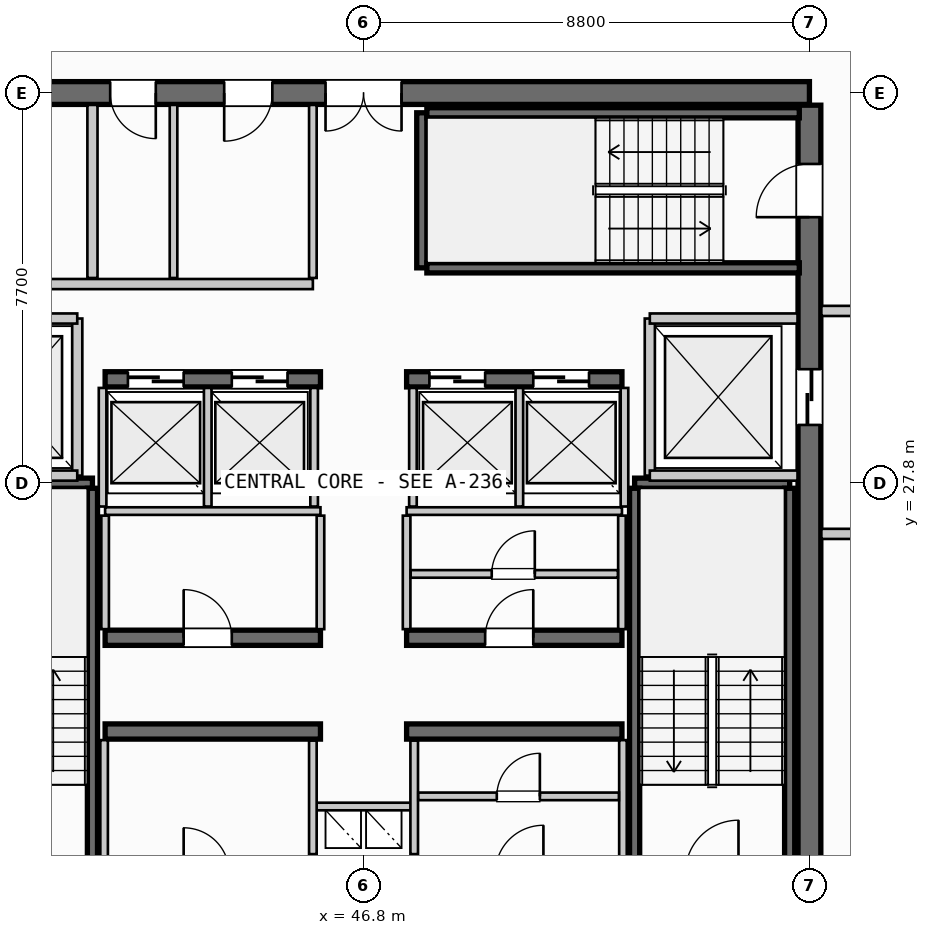
"""IFC4 building model, lengths in metres.
Left out: names, types, materials, properties, quantities, classifications, styles, units other than length and angle.
Written with IfcOpenShell. Run it as: python <this file> out.ifc"""

import sys

from ifc_helpers import new_model, si_unit, direction, frame, frame_2d, origin, place, context, subcontext, project, spatial, rectangle, extrude, source, transform, mapped, element, fill, save


model = new_model("IFC4")
c1 = context("Model", 3, precision=1e-05, world=origin(), true_north=direction((0.0, 1.0)))
c2 = subcontext(c1, "Body", "Model", "MODEL_VIEW")
j1 = project(units=[si_unit("LENGTHUNIT", "METRE"), si_unit("PLANEANGLEUNIT", "RADIAN")], contexts=[c1])
p1 = place(None, origin())
s1 = spatial("IfcSite", under=j1, at=p1, CompositionType="ELEMENT")
p2 = place(p1, origin())
s2 = spatial("IfcBuilding", under=s1, at=p2, CompositionType="ELEMENT")
p3 = place(p2, frame((0.0, 0.0, 259.45)))
s3 = spatial("IfcBuildingStorey", under=s2, at=p3, CompositionType="ELEMENT", Elevation=259.45)
p4 = place(p3, frame((55.6, 35.5, 0.0), z_axis=(0.0, 0.0, 1.0), x_axis=(-1.0, 0.0, 0.0)))
e1 = element("IfcWall", 1, at=p4, inside=s3, PredefinedType="SHEAR", context=c2, shape_type="SweptSolid", body=[
    extrude(rectangle(XDim=17.6, YDim=0.45, at=frame_2d((8.8, 0.0))), origin(), (0.0, 0.0, 1.0), 3.21),
])
p5 = place(p4, frame((8.05, 0.0, 0.0)))
e2 = element("IfcOpeningElement", 2, at=p5, cuts=e1, PredefinedType="OPENING", context=c2, shape_type="SweptSolid", body=[
    extrude(rectangle(XDim=1.5, YDim=2.2, at=frame_2d((0.75, 1.1))), frame((0.0, 0.235, 0.0), z_axis=(0.0, -1.0, 0.0), x_axis=(1.0, 0.0, 0.0)), (0.0, 0.0, 1.0), 0.47),
])
p6 = place(p4, frame((15.1, 0.0, 0.0)))
e3 = element("IfcOpeningElement", 3, at=p6, cuts=e1, PredefinedType="OPENING", context=c2, shape_type="SweptSolid", body=[
    extrude(rectangle(XDim=0.95, YDim=2.15, at=frame_2d((0.475, 1.075))), frame((0.0, 0.235, 0.0), z_axis=(0.0, -1.0, 0.0), x_axis=(1.0, 0.0, 0.0)), (0.0, 0.0, 1.0), 0.47),
])
p7 = place(p4, frame((12.9, 0.0, 0.0)))
e4 = element("IfcOpeningElement", 4, at=p7, cuts=e1, PredefinedType="OPENING", context=c2, shape_type="SweptSolid", body=[
    extrude(rectangle(XDim=0.9, YDim=2.15, at=frame_2d((0.45, 1.075))), frame((0.0, 0.235, 0.0), z_axis=(0.0, -1.0, 0.0), x_axis=(1.0, 0.0, 0.0)), (0.0, 0.0, 1.0), 0.47),
])
p8 = place(p4, frame((10.6, 0.0, 0.0)))
e5 = element("IfcOpeningElement", 5, at=p8, cuts=e1, PredefinedType="OPENING", context=c2, shape_type="SweptSolid", body=[
    extrude(rectangle(XDim=0.95, YDim=2.15, at=frame_2d((0.475, 1.075))), frame((0.0, 0.235, 0.0), z_axis=(0.0, -1.0, 0.0), x_axis=(1.0, 0.0, 0.0)), (0.0, 0.0, 1.0), 0.47),
])
p9 = place(p3, frame((55.6, 20.34, 0.0), z_axis=(0.0, 0.0, 1.0), x_axis=(0.0, 1.0, 0.0)))
e6 = element("IfcWall", 6, at=p9, inside=s3, PredefinedType="SHEAR", context=c2, shape_type="SweptSolid", body=[
    extrude(rectangle(XDim=14.92, YDim=0.45, at=frame_2d((7.46, 0.0))), origin(), (0.0, 0.0, 1.0), 3.21),
])
p10 = place(p9, frame((12.71, 0.0, 0.0)))
e7 = element("IfcOpeningElement", 7, at=p10, cuts=e6, PredefinedType="OPENING", context=c2, shape_type="SweptSolid", body=[
    extrude(rectangle(XDim=1.05, YDim=2.15, at=frame_2d((0.525, 1.075))), frame((0.0, 0.235, 0.0), z_axis=(0.0, -1.0, 0.0), x_axis=(1.0, 0.0, 0.0)), (0.0, 0.0, 1.0), 0.47),
])
p11 = place(p9, frame((8.61, 0.0, 0.0)))
e8 = element("IfcOpeningElement", 8, at=p11, cuts=e6, PredefinedType="OPENING", context=c2, shape_type="SweptSolid", body=[
    extrude(rectangle(XDim=1.1, YDim=2.2, at=frame_2d((0.55, 1.1))), frame((0.0, 0.235, 0.0), z_axis=(0.0, -1.0, 0.0), x_axis=(1.0, 0.0, 0.0)), (0.0, 0.0, 1.0), 0.47),
])
for number, where, z_axis, x_axis in (
    (9, (41.7, 22.9, 0.0), (0.0, 0.0, 1.0), (1.0, 0.0, 0.0)),
    (10, (47.65, 22.9, 0.0), (0.0, 0.0, 1.0), (1.0, 0.0, 0.0)),
):
    element("IfcWall", number, at=place(p3, frame(where, z_axis=z_axis, x_axis=x_axis)), inside=s3, PredefinedType="SHEAR", context=c2, shape_type="SweptSolid", body=[
        extrude(rectangle(XDim=4.25, YDim=0.3, at=frame_2d((2.125, 0.0))), origin(), (0.0, 0.0, 1.0), 3.21),
    ])
p12 = place(p3, frame((41.7, 24.75, 0.0), z_axis=(0.0, 0.0, 1.0), x_axis=(1.0, 0.0, 0.0)))
e11 = element("IfcWall", 11, at=p12, inside=s3, PredefinedType="SHEAR", context=c2, shape_type="SweptSolid", body=[
    extrude(rectangle(XDim=4.25, YDim=0.3, at=frame_2d((2.125, 0.0))), origin(), (0.0, 0.0, 1.0), 3.21),
])
p13 = place(p12, frame((1.55, 0.0, 0.0)))
e12 = element("IfcOpeningElement", 12, at=p13, cuts=e11, PredefinedType="OPENING", context=c2, shape_type="SweptSolid", body=[
    extrude(rectangle(XDim=0.95, YDim=2.15, at=frame_2d((0.475, 1.075))), frame((0.0, 0.16, 0.0), z_axis=(0.0, -1.0, 0.0), x_axis=(1.0, 0.0, 0.0)), (0.0, 0.0, 1.0), 0.32),
])
p14 = place(p3, frame((47.65, 24.75, 0.0), z_axis=(0.0, 0.0, 1.0), x_axis=(1.0, 0.0, 0.0)))
e13 = element("IfcWall", 13, at=p14, inside=s3, PredefinedType="SHEAR", context=c2, shape_type="SweptSolid", body=[
    extrude(rectangle(XDim=4.25, YDim=0.3, at=frame_2d((2.125, 0.0))), origin(), (0.0, 0.0, 1.0), 3.21),
])
p15 = place(p14, frame((1.55, 0.0, 0.0)))
e14 = element("IfcOpeningElement", 14, at=p15, cuts=e13, PredefinedType="OPENING", context=c2, shape_type="SweptSolid", body=[
    extrude(rectangle(XDim=0.95, YDim=2.15, at=frame_2d((0.475, 1.075))), frame((0.0, 0.16, 0.0), z_axis=(0.0, -1.0, 0.0), x_axis=(1.0, 0.0, 0.0)), (0.0, 0.0, 1.0), 0.32),
])
p16 = place(p3, frame((41.7, 29.85, 0.0), z_axis=(0.0, 0.0, 1.0), x_axis=(1.0, 0.0, 0.0)))
e15 = element("IfcWall", 15, at=p16, inside=s3, PredefinedType="SHEAR", context=c2, shape_type="SweptSolid", body=[
    extrude(rectangle(XDim=4.25, YDim=0.3, at=frame_2d((2.125, 0.0))), origin(), (0.0, 0.0, 1.0), 3.21),
])
p17 = place(p16, frame((0.45, 0.0, 0.0)))
e16 = element("IfcOpeningElement", 16, at=p17, cuts=e15, PredefinedType="OPENING", context=c2, shape_type="SweptSolid", body=[
    extrude(rectangle(XDim=1.1, YDim=2.2, at=frame_2d((0.55, 1.1))), frame((0.0, 0.16, 0.0), z_axis=(0.0, -1.0, 0.0), x_axis=(1.0, 0.0, 0.0)), (0.0, 0.0, 1.0), 0.32),
])
p18 = place(p16, frame((2.5, 0.0, 0.0)))
e17 = element("IfcOpeningElement", 17, at=p18, cuts=e15, PredefinedType="OPENING", context=c2, shape_type="SweptSolid", body=[
    extrude(rectangle(XDim=1.1, YDim=2.2, at=frame_2d((0.55, 1.1))), frame((0.0, 0.16, 0.0), z_axis=(0.0, -1.0, 0.0), x_axis=(1.0, 0.0, 0.0)), (0.0, 0.0, 1.0), 0.32),
])
p19 = place(p3, frame((47.65, 29.85, 0.0), z_axis=(0.0, 0.0, 1.0), x_axis=(1.0, 0.0, 0.0)))
e18 = element("IfcWall", 18, at=p19, inside=s3, PredefinedType="SHEAR", context=c2, shape_type="SweptSolid", body=[
    extrude(rectangle(XDim=4.25, YDim=0.3, at=frame_2d((2.125, 0.0))), origin(), (0.0, 0.0, 1.0), 3.21),
])
p20 = place(p19, frame((0.45, 0.0, 0.0)))
e19 = element("IfcOpeningElement", 19, at=p20, cuts=e18, PredefinedType="OPENING", context=c2, shape_type="SweptSolid", body=[
    extrude(rectangle(XDim=1.1, YDim=2.2, at=frame_2d((0.55, 1.1))), frame((0.0, 0.16, 0.0), z_axis=(0.0, -1.0, 0.0), x_axis=(1.0, 0.0, 0.0)), (0.0, 0.0, 1.0), 0.32),
])
p21 = place(p19, frame((2.5, 0.0, 0.0)))
e20 = element("IfcOpeningElement", 20, at=p21, cuts=e18, PredefinedType="OPENING", context=c2, shape_type="SweptSolid", body=[
    extrude(rectangle(XDim=1.1, YDim=2.2, at=frame_2d((0.55, 1.1))), frame((0.0, 0.16, 0.0), z_axis=(0.0, -1.0, 0.0), x_axis=(1.0, 0.0, 0.0)), (0.0, 0.0, 1.0), 0.32),
])
p22 = place(p3, frame((38.39, 27.8, 0.0), z_axis=(0.0, 0.0, 1.0), x_axis=(1.0, 0.0, 0.0)))
e21 = element("IfcWall", 21, at=p22, inside=s3, PredefinedType="SHEAR", context=c2, shape_type="SweptSolid", body=[
    extrude(rectangle(XDim=3.06, YDim=0.2, at=frame_2d((1.53, 0.0))), origin(), (0.0, 0.0, 1.0), 3.21),
])
p23 = place(p3, frame((41.45, 27.7, 0.0), z_axis=(0.0, 0.0, 1.0), x_axis=(0.0, -1.0, 0.0)))
e22 = element("IfcWall", 22, at=p23, inside=s3, PredefinedType="SHEAR", context=c2, shape_type="SweptSolid", body=[
    extrude(rectangle(XDim=7.35, YDim=0.2, at=frame_2d((3.675, 0.0))), origin(), (0.0, 0.0, 1.0), 3.21),
])
p24 = place(p3, frame((52.15, 27.8, 0.0), z_axis=(0.0, 0.0, 1.0), x_axis=(1.0, 0.0, 0.0)))
e23 = element("IfcWall", 23, at=p24, inside=s3, PredefinedType="SHEAR", context=c2, shape_type="SweptSolid", body=[
    extrude(rectangle(XDim=3.06, YDim=0.2, at=frame_2d((1.53, 0.0))), origin(), (0.0, 0.0, 1.0), 3.21),
])
for number, where, z_axis, x_axis in (
    (24, (55.21, 27.7, 0.0), (0.0, 0.0, 1.0), (0.0, -1.0, 0.0)),
    (25, (52.15, 20.35, 0.0), (0.0, 0.0, 1.0), (0.0, 1.0, 0.0)),
):
    element("IfcWall", number, at=place(p3, frame(where, z_axis=z_axis, x_axis=x_axis)), inside=s3, PredefinedType="SHEAR", context=c2, shape_type="SweptSolid", body=[
        extrude(rectangle(XDim=7.35, YDim=0.2, at=frame_2d((3.675, 0.0))), origin(), (0.0, 0.0, 1.0), 3.21),
    ])
p25 = place(p3, frame((47.95, 32.05, 0.0), z_axis=(0.0, 0.0, 1.0), x_axis=(0.0, 1.0, 0.0)))
e26 = element("IfcWall", 26, at=p25, inside=s3, PredefinedType="SHEAR", context=c2, shape_type="SweptSolid", body=[
    extrude(rectangle(XDim=3.06, YDim=0.2, at=frame_2d((1.53, 0.0))), origin(), (0.0, 0.0, 1.0), 3.21),
])
for number, where, z_axis, x_axis in (
    (27, (48.05, 35.11, 0.0), (0.0, 0.0, 1.0), (1.0, 0.0, 0.0)),
    (28, (55.4, 32.05, 0.0), (0.0, 0.0, 1.0), (-1.0, 0.0, 0.0)),
):
    element("IfcWall", number, at=place(p3, frame(where, z_axis=z_axis, x_axis=x_axis)), inside=s3, PredefinedType="SHEAR", context=c2, shape_type="SweptSolid", body=[
        extrude(rectangle(XDim=7.35, YDim=0.2, at=frame_2d((3.675, 0.0))), origin(), (0.0, 0.0, 1.0), 3.21),
    ])
p26 = place(p3, frame((45.8, 21.42, 0.0), z_axis=(0.0, 0.0, 1.0), x_axis=(1.0, 0.0, 0.0)))
e29 = element("IfcWall", 29, at=p26, inside=s3, PredefinedType="PARTITIONING", context=c2, shape_type="SweptSolid", body=[
    extrude(rectangle(XDim=2.0, YDim=0.15, at=frame_2d((1.0, 0.0))), origin(), (0.0, 0.0, 1.0), 2.735),
])
for number, where, z_axis, x_axis in (
    (30, (45.8, 20.48, 0.0), (0.0, 0.0, 1.0), (0.0, 1.0, 0.0)),
    (31, (47.8, 20.48, 0.0), (0.0, 0.0, 1.0), (0.0, 1.0, 0.0)),
):
    element("IfcWall", number, at=place(p3, frame(where, z_axis=z_axis, x_axis=x_axis)), inside=s3, PredefinedType="PARTITIONING", context=c2, shape_type="SweptSolid", body=[
        extrude(rectangle(XDim=2.24, YDim=0.15, at=frame_2d((1.12, 0.0))), origin(), (0.0, 0.0, 1.0), 2.735),
    ])
p27 = place(p3, frame((41.15, 27.95, 0.0), z_axis=(0.0, 0.0, 1.0), x_axis=(0.0, 1.0, 0.0)))
e32 = element("IfcWall", 32, at=p27, inside=s3, PredefinedType="PARTITIONING", context=c2, shape_type="SweptSolid", body=[
    extrude(rectangle(XDim=3.1, YDim=0.2, at=frame_2d((1.55, 0.0))), origin(), (0.0, 0.0, 1.0), 2.735),
])
for number, where, z_axis, x_axis in (
    (33, (38.235, 27.95, 0.0), (0.0, 0.0, 1.0), (1.0, 0.0, 0.0)),
    (34, (38.235, 31.05, 0.0), (0.0, 0.0, 1.0), (1.0, 0.0, 0.0)),
):
    element("IfcWall", number, at=place(p3, frame(where, z_axis=z_axis, x_axis=x_axis)), inside=s3, PredefinedType="PARTITIONING", context=c2, shape_type="SweptSolid", body=[
        extrude(rectangle(XDim=2.915, YDim=0.2, at=frame_2d((1.458, 0.0))), origin(), (0.0, 0.0, 1.0), 2.735),
    ])
p28 = place(p3, frame((52.45, 27.95, 0.0), z_axis=(0.0, 0.0, 1.0), x_axis=(0.0, 1.0, 0.0)))
e35 = element("IfcWall", 35, at=p28, inside=s3, PredefinedType="PARTITIONING", context=c2, shape_type="SweptSolid", body=[
    extrude(rectangle(XDim=3.1, YDim=0.2, at=frame_2d((1.55, 0.0))), origin(), (0.0, 0.0, 1.0), 2.735),
])
for number, where, z_axis, x_axis in (
    (36, (52.45, 27.95, 0.0), (0.0, 0.0, 1.0), (1.0, 0.0, 0.0)),
    (37, (52.45, 31.05, 0.0), (0.0, 0.0, 1.0), (1.0, 0.0, 0.0)),
):
    element("IfcWall", number, at=place(p3, frame(where, z_axis=z_axis, x_axis=x_axis)), inside=s3, PredefinedType="PARTITIONING", context=c2, shape_type="SweptSolid", body=[
        extrude(rectangle(XDim=2.915, YDim=0.2, at=frame_2d((1.458, 0.0))), origin(), (0.0, 0.0, 1.0), 2.735),
    ])
for number, where, z_axis, x_axis in (
    (38, (55.835, 26.8, 0.0), (0.0, 0.0, 1.0), (1.0, 0.0, 0.0)),
    (39, (55.835, 31.2, 0.0), (0.0, 0.0, 1.0), (1.0, 0.0, 0.0)),
):
    element("IfcWall", number, at=place(p3, frame(where, z_axis=z_axis, x_axis=x_axis)), inside=s3, PredefinedType="PARTITIONING", context=c2, shape_type="SweptSolid", body=[
        extrude(rectangle(XDim=3.265, YDim=0.2, at=frame_2d((1.633, 0.0))), origin(), (0.0, 0.0, 1.0), 2.735),
    ])
for number, where, z_axis, x_axis in (
    (40, (41.68, 20.335, 0.0), (0.0, 0.0, 1.0), (0.0, 1.0, 0.0)),
    (41, (51.92, 20.335, 0.0), (0.0, 0.0, 1.0), (0.0, 1.0, 0.0)),
):
    element("IfcWall", number, at=place(p3, frame(where, z_axis=z_axis, x_axis=x_axis)), inside=s3, PredefinedType="PARTITIONING", context=c2, shape_type="SweptSolid", body=[
        extrude(rectangle(XDim=2.395, YDim=0.15, at=frame_2d((1.198, 0.0))), origin(), (0.0, 0.0, 1.0), 2.735),
    ])
p29 = place(p3, frame((47.88, 21.62, 0.0), z_axis=(0.0, 0.0, 1.0), x_axis=(1.0, 0.0, 0.0)))
e42 = element("IfcWall", 42, at=p29, inside=s3, PredefinedType="PARTITIONING", context=c2, shape_type="SweptSolid", body=[
    extrude(rectangle(XDim=3.96, YDim=0.15, at=frame_2d((1.98, 0.0))), origin(), (0.0, 0.0, 1.0), 2.735),
])
p30 = place(p29, frame((1.55, 0.0, 0.0)))
e43 = element("IfcOpeningElement", 43, at=p30, cuts=e42, PredefinedType="OPENING", context=c2, shape_type="SweptSolid", body=[
    extrude(rectangle(XDim=0.85, YDim=2.15, at=frame_2d((0.425, 1.075))), frame((0.0, 0.085, 0.0), z_axis=(0.0, -1.0, 0.0), x_axis=(1.0, 0.0, 0.0)), (0.0, 0.0, 1.0), 0.17),
])
for number, where, z_axis, x_axis in (
    (44, (41.7, 27.25, 0.0), (0.0, 0.0, 1.0), (1.0, 0.0, 0.0)),
    (45, (47.65, 27.25, 0.0), (0.0, 0.0, 1.0), (1.0, 0.0, 0.0)),
):
    element("IfcWall", number, at=place(p3, frame(where, z_axis=z_axis, x_axis=x_axis)), inside=s3, PredefinedType="PARTITIONING", context=c2, shape_type="SweptSolid", body=[
        extrude(rectangle(XDim=4.25, YDim=0.15, at=frame_2d((2.125, 0.0))), origin(), (0.0, 0.0, 1.0), 2.735),
    ])
for number, where, z_axis, x_axis in (
    (46, (41.7, 24.92, 0.0), (0.0, 0.0, 1.0), (0.0, 1.0, 0.0)),
    (47, (45.95, 24.92, 0.0), (0.0, 0.0, 1.0), (0.0, 1.0, 0.0)),
    (48, (47.65, 24.92, 0.0), (0.0, 0.0, 1.0), (0.0, 1.0, 0.0)),
    (49, (51.9, 24.92, 0.0), (0.0, 0.0, 1.0), (0.0, 1.0, 0.0)),
):
    element("IfcWall", number, at=place(p3, frame(where, z_axis=z_axis, x_axis=x_axis)), inside=s3, PredefinedType="PARTITIONING", context=c2, shape_type="SweptSolid", body=[
        extrude(rectangle(XDim=2.24, YDim=0.15, at=frame_2d((1.12, 0.0))), origin(), (0.0, 0.0, 1.0), 2.735),
    ])
p31 = place(p3, frame((47.73, 26.01, 0.0), z_axis=(0.0, 0.0, 1.0), x_axis=(1.0, 0.0, 0.0)))
e50 = element("IfcWall", 50, at=p31, inside=s3, PredefinedType="PARTITIONING", context=c2, shape_type="SweptSolid", body=[
    extrude(rectangle(XDim=4.09, YDim=0.15, at=frame_2d((2.045, 0.0))), origin(), (0.0, 0.0, 1.0), 2.735),
])
p32 = place(p31, frame((1.6, 0.0, 0.0)))
e51 = element("IfcOpeningElement", 51, at=p32, cuts=e50, PredefinedType="OPENING", context=c2, shape_type="SweptSolid", body=[
    extrude(rectangle(XDim=0.85, YDim=2.15, at=frame_2d((0.425, 1.075))), frame((0.0, 0.085, 0.0), z_axis=(0.0, -1.0, 0.0), x_axis=(1.0, 0.0, 0.0)), (0.0, 0.0, 1.0), 0.17),
])
for number, where, z_axis, x_axis in (
    (52, (41.65, 27.34, 0.0), (0.0, 0.0, 1.0), (0.0, 1.0, 0.0)),
    (53, (43.725, 27.34, 0.0), (0.0, 0.0, 1.0), (0.0, 1.0, 0.0)),
    (54, (45.825, 27.34, 0.0), (0.0, 0.0, 1.0), (0.0, 1.0, 0.0)),
    (55, (47.775, 27.34, 0.0), (0.0, 0.0, 1.0), (0.0, 1.0, 0.0)),
    (56, (49.875, 27.34, 0.0), (0.0, 0.0, 1.0), (0.0, 1.0, 0.0)),
    (57, (51.95, 27.34, 0.0), (0.0, 0.0, 1.0), (0.0, 1.0, 0.0)),
):
    element("IfcWall", number, at=place(p3, frame(where, z_axis=z_axis, x_axis=x_axis)), inside=s3, PredefinedType="PARTITIONING", context=c2, shape_type="SweptSolid", body=[
        extrude(rectangle(XDim=2.34, YDim=0.15, at=frame_2d((1.17, 0.0))), origin(), (0.0, 0.0, 1.0), 2.735),
    ])
p33 = place(p3, frame((41.45, 31.85, 0.0), z_axis=(0.0, 0.0, 1.0), x_axis=(0.0, 1.0, 0.0)))
e58 = element("IfcWall", 58, at=p33, inside=s3, PredefinedType="PARTITIONING", context=c2, shape_type="SweptSolid", body=[
    extrude(rectangle(XDim=3.415, YDim=0.2, at=frame_2d((1.708, 0.0))), origin(), (0.0, 0.0, 1.0), 2.735),
])
p34 = place(p3, frame((38.235, 31.73, 0.0), z_axis=(0.0, 0.0, 1.0), x_axis=(1.0, 0.0, 0.0)))
e59 = element("IfcWall", 59, at=p34, inside=s3, PredefinedType="PARTITIONING", context=c2, shape_type="SweptSolid", body=[
    extrude(rectangle(XDim=7.565, YDim=0.2, at=frame_2d((3.782, 0.0))), origin(), (0.0, 0.0, 1.0), 2.735),
])
p35 = place(p3, frame((45.8, 31.85, 0.0), z_axis=(0.0, 0.0, 1.0), x_axis=(0.0, 1.0, 0.0)))
e60 = element("IfcWall", 60, at=p35, inside=s3, PredefinedType="PARTITIONING", context=c2, shape_type="SweptSolid", body=[
    extrude(rectangle(XDim=3.415, YDim=0.15, at=frame_2d((1.708, 0.0))), origin(), (0.0, 0.0, 1.0), 2.735),
])
p36 = place(p3, frame((43.05, 31.85, 0.0), z_axis=(0.0, 0.0, 1.0), x_axis=(0.0, 1.0, 0.0)))
e61 = element("IfcWall", 61, at=p36, inside=s3, PredefinedType="PLUMBINGWALL", context=c2, shape_type="SweptSolid", body=[
    extrude(rectangle(XDim=3.415, YDim=0.15, at=frame_2d((1.708, 0.0))), origin(), (0.0, 0.0, 1.0), 2.735),
])
m1 = source(origin(), c2, "Body", "SweptSolid", [
    extrude(rectangle(XDim=1.05, YDim=2.15, at=frame_2d((0.525, 1.075))), frame((0.0, 0.025, 0.0), z_axis=(0.0, -1.0, 0.0), x_axis=(1.0, 0.0, 0.0)), (0.0, 0.0, 1.0), 0.05),
])
p37 = place(p10, origin())
e62 = element("IfcDoor", 62, at=p37, inside=s3, OperationType="SINGLE_SWING_LEFT", PredefinedType="DOOR", context=c2, shape_type="MappedRepresentation", body=[
    mapped(m1, transform((0.0, 0.0, 0.0), scale=1.0)),
])
fill(e7, e62)
m2 = source(origin(), c2, "Body", "SweptSolid", [
    extrude(rectangle(XDim=1.5, YDim=2.2, at=frame_2d((0.75, 1.1))), frame((0.0, 0.025, 0.0), z_axis=(0.0, -1.0, 0.0), x_axis=(1.0, 0.0, 0.0)), (0.0, 0.0, 1.0), 0.05),
])
p38 = place(p5, origin())
e63 = element("IfcDoor", 63, at=p38, inside=s3, OperationType="DOUBLE_DOOR_SINGLE_SWING", PredefinedType="DOOR", context=c2, shape_type="MappedRepresentation", body=[
    mapped(m2, transform((0.0, 0.0, 0.0), scale=1.0)),
])
fill(e2, e63)
m3 = source(origin(), c2, "Body", "SweptSolid", [
    extrude(rectangle(XDim=1.1, YDim=2.2, at=frame_2d((0.55, 1.1))), frame((0.0, 0.025, 0.0), z_axis=(0.0, -1.0, 0.0), x_axis=(1.0, 0.0, 0.0)), (0.0, 0.0, 1.0), 0.05),
])
p39 = place(p11, origin())
e64 = element("IfcDoor", 64, at=p39, inside=s3, OperationType="SLIDING_TO_RIGHT", PredefinedType="DOOR", context=c2, shape_type="MappedRepresentation", body=[
    mapped(m3, transform((0.0, 0.0, 0.0), scale=1.0)),
])
fill(e8, e64)
m4 = source(origin(), c2, "Body", "SweptSolid", [
    extrude(rectangle(XDim=0.95, YDim=2.15, at=frame_2d((0.475, 1.075))), frame((0.0, 0.025, 0.0), z_axis=(0.0, -1.0, 0.0), x_axis=(1.0, 0.0, 0.0)), (0.0, 0.0, 1.0), 0.05),
])
p40 = place(p13, origin())
e65 = element("IfcDoor", 65, at=p40, inside=s3, OperationType="SINGLE_SWING_LEFT", PredefinedType="DOOR", context=c2, shape_type="MappedRepresentation", body=[
    mapped(m4, transform((0.0, 0.0, 0.0), scale=1.0)),
])
fill(e12, e65)
p41 = place(p15, origin())
e66 = element("IfcDoor", 66, at=p41, inside=s3, OperationType="SINGLE_SWING_RIGHT", PredefinedType="DOOR", context=c2, shape_type="MappedRepresentation", body=[
    mapped(m4, transform((0.0, 0.0, 0.0), scale=1.0)),
])
fill(e14, e66)
p42 = place(p17, origin())
e67 = element("IfcDoor", 67, at=p42, inside=s3, OperationType="SLIDING_TO_LEFT", PredefinedType="DOOR", context=c2, shape_type="MappedRepresentation", body=[
    mapped(m3, transform((0.0, 0.0, 0.0), scale=1.0)),
])
fill(e16, e67)
p43 = place(p18, origin())
e68 = element("IfcDoor", 68, at=p43, inside=s3, OperationType="SLIDING_TO_LEFT", PredefinedType="DOOR", context=c2, shape_type="MappedRepresentation", body=[
    mapped(m3, transform((0.0, 0.0, 0.0), scale=1.0)),
])
fill(e17, e68)
p44 = place(p20, origin())
e69 = element("IfcDoor", 69, at=p44, inside=s3, OperationType="SLIDING_TO_LEFT", PredefinedType="DOOR", context=c2, shape_type="MappedRepresentation", body=[
    mapped(m3, transform((0.0, 0.0, 0.0), scale=1.0)),
])
fill(e19, e69)
p45 = place(p21, origin())
e70 = element("IfcDoor", 70, at=p45, inside=s3, OperationType="SLIDING_TO_LEFT", PredefinedType="DOOR", context=c2, shape_type="MappedRepresentation", body=[
    mapped(m3, transform((0.0, 0.0, 0.0), scale=1.0)),
])
fill(e20, e70)
m5 = source(origin(), c2, "Body", "SweptSolid", [
    extrude(rectangle(XDim=0.9, YDim=2.15, at=frame_2d((0.45, 1.075))), frame((0.0, 0.025, 0.0), z_axis=(0.0, -1.0, 0.0), x_axis=(1.0, 0.0, 0.0)), (0.0, 0.0, 1.0), 0.05),
])
p46 = place(p7, origin())
e71 = element("IfcDoor", 71, at=p46, inside=s3, OperationType="SINGLE_SWING_LEFT", PredefinedType="DOOR", context=c2, shape_type="MappedRepresentation", body=[
    mapped(m5, transform((0.0, 0.0, 0.0), scale=1.0)),
])
fill(e4, e71)
p47 = place(p8, origin())
e72 = element("IfcDoor", 72, at=p47, inside=s3, OperationType="SINGLE_SWING_RIGHT", PredefinedType="DOOR", context=c2, shape_type="MappedRepresentation", body=[
    mapped(m4, transform((0.0, 0.0, 0.0), scale=1.0)),
])
fill(e5, e72)
m6 = source(origin(), c2, "Body", "SweptSolid", [
    extrude(rectangle(XDim=0.85, YDim=2.15, at=frame_2d((0.425, 1.075))), frame((0.0, 0.025, 0.0), z_axis=(0.0, -1.0, 0.0), x_axis=(1.0, 0.0, 0.0)), (0.0, 0.0, 1.0), 0.05),
])
p48 = place(p30, origin())
e73 = element("IfcDoor", 73, at=p48, inside=s3, OperationType="SINGLE_SWING_RIGHT", PredefinedType="DOOR", context=c2, shape_type="MappedRepresentation", body=[
    mapped(m6, transform((0.0, 0.0, 0.0), scale=1.0)),
])
fill(e43, e73)
p49 = place(p32, origin())
e74 = element("IfcDoor", 74, at=p49, inside=s3, OperationType="SINGLE_SWING_RIGHT", PredefinedType="DOOR", context=c2, shape_type="MappedRepresentation", body=[
    mapped(m6, transform((0.0, 0.0, 0.0), scale=1.0)),
])
fill(e51, e74)
save(model, sys.argv[1])
